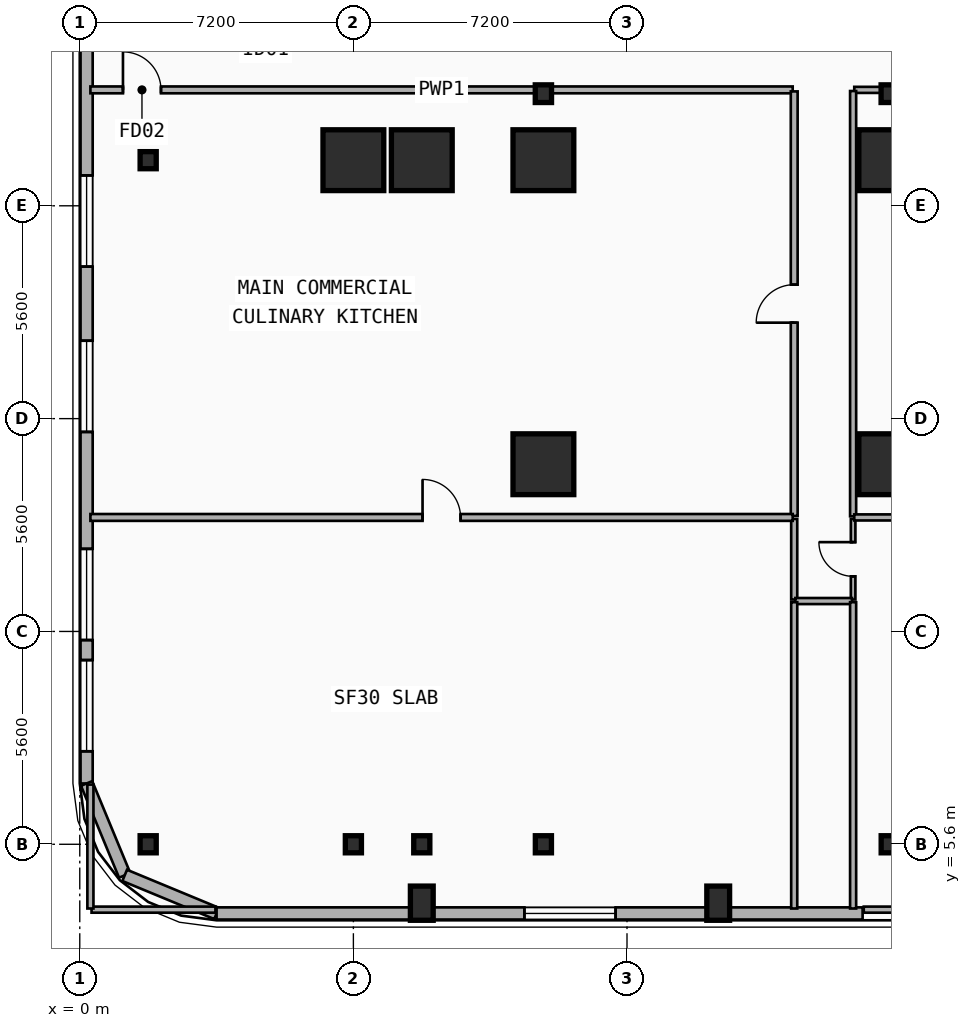
"""IFC4 building model, lengths in metres.
Left out: names, types, materials, properties, quantities, classifications, styles, units other than length and angle.
Written with IfcOpenShell. Run it as: python <this file> out.ifc"""

import sys

from ifc_helpers import new_model, si_unit, direction, frame, frame_2d, origin, origin_2d, place, context, subcontext, project, spatial, rectangle, i_section, extrude, element, fill, save


model = new_model("IFC4")
c1 = context("Model", 3, precision=1e-05, world=origin(), true_north=direction((0.0, 1.0)))
c2 = subcontext(c1, "Body", "Model", "MODEL_VIEW")
j1 = project(units=[si_unit("LENGTHUNIT", "METRE"), si_unit("PLANEANGLEUNIT", "RADIAN")], contexts=[c1])
p1 = place(None, origin())
s1 = spatial("IfcSite", under=j1, at=p1, CompositionType="ELEMENT")
p2 = place(p1, origin())
s2 = spatial("IfcBuilding", under=s1, at=p2, CompositionType="ELEMENT")
p3 = place(p2, frame((0.0, 0.0, 14.9)))
s3 = spatial("IfcBuildingStorey", under=s2, at=p3, CompositionType="ELEMENT", Elevation=14.9)
for number, where, z_axis, x_axis in (
    (1, (12.2, 25.35, 0.0), (0.0, 0.0, 1.0), (1.0, 0.0, 0.0)),
    (2, (21.3, 25.35, 0.0), (0.0, 0.0, 1.0), (1.0, 0.0, 0.0)),
):
    element("IfcColumn", number, at=place(p3, frame(where, z_axis=z_axis, x_axis=x_axis)), inside=s3, PredefinedType="COLUMN", context=c2, shape_type="SweptSolid", body=[
        extrude(i_section(OverallWidth=0.428, OverallDepth=0.465, WebThickness=0.045, FlangeThickness=0.073, FilletRadius=0.015, at=origin_2d()), origin(), (0.0, 0.0, 1.0), 4.5),
    ])
for number, where, z_axis, x_axis in (
    (3, (1.8, 5.6, 0.0), (0.0, 0.0, 1.0), (1.0, 0.0, 0.0)),
    (4, (1.8, 23.6, 0.0), (0.0, 0.0, 1.0), (1.0, 0.0, 0.0)),
    (5, (7.2, 5.6, 0.0), (0.0, 0.0, 1.0), (1.0, 0.0, 0.0)),
):
    element("IfcColumn", number, at=place(p3, frame(where, z_axis=z_axis, x_axis=x_axis)), inside=s3, PredefinedType="COLUMN", context=c2, shape_type="SweptSolid", body=[
        extrude(i_section(OverallWidth=0.424, OverallDepth=0.45, WebThickness=0.041, FlangeThickness=0.065, FilletRadius=0.015, at=origin_2d()), origin(), (0.0, 0.0, 1.0), 4.5),
    ])
p4 = place(p3, frame((7.2, 23.6, 0.0), z_axis=(0.0, 0.0, 1.0), x_axis=(1.0, 0.0, 0.0)))
e6 = element("IfcColumn", 6, at=p4, inside=s3, PredefinedType="COLUMN", context=c2, shape_type="SweptSolid", body=[
    extrude(rectangle(XDim=1.6, YDim=1.6, at=origin_2d()), origin(), (0.0, 0.0, 1.0), 4.5),
])
p5 = place(p3, frame((9.0, 5.6, 0.0), z_axis=(0.0, 0.0, 1.0), x_axis=(1.0, 0.0, 0.0)))
e7 = element("IfcColumn", 7, at=p5, inside=s3, PredefinedType="COLUMN", context=c2, shape_type="SweptSolid", body=[
    extrude(i_section(OverallWidth=0.424, OverallDepth=0.45, WebThickness=0.041, FlangeThickness=0.065, FilletRadius=0.015, at=origin_2d()), origin(), (0.0, 0.0, 1.0), 4.5),
])
p6 = place(p3, frame((9.0, 23.6, 0.0), z_axis=(0.0, 0.0, 1.0), x_axis=(1.0, 0.0, 0.0)))
e8 = element("IfcColumn", 8, at=p6, inside=s3, PredefinedType="COLUMN", context=c2, shape_type="SweptSolid", body=[
    extrude(rectangle(XDim=1.6, YDim=1.6, at=origin_2d()), origin(), (0.0, 0.0, 1.0), 4.5),
])
p7 = place(p3, frame((12.2, 5.6, 0.0), z_axis=(0.0, 0.0, 1.0), x_axis=(1.0, 0.0, 0.0)))
e9 = element("IfcColumn", 9, at=p7, inside=s3, PredefinedType="COLUMN", context=c2, shape_type="SweptSolid", body=[
    extrude(i_section(OverallWidth=0.424, OverallDepth=0.45, WebThickness=0.041, FlangeThickness=0.065, FilletRadius=0.015, at=origin_2d()), origin(), (0.0, 0.0, 1.0), 4.5),
])
for number, where, z_axis, x_axis in (
    (10, (12.2, 15.6, 0.0), (0.0, 0.0, 1.0), (1.0, 0.0, 0.0)),
    (11, (12.2, 23.6, 0.0), (0.0, 0.0, 1.0), (1.0, 0.0, 0.0)),
):
    element("IfcColumn", number, at=place(p3, frame(where, z_axis=z_axis, x_axis=x_axis)), inside=s3, PredefinedType="COLUMN", context=c2, shape_type="SweptSolid", body=[
        extrude(rectangle(XDim=1.6, YDim=1.6, at=origin_2d()), origin(), (0.0, 0.0, 1.0), 4.5),
    ])
p8 = place(p3, frame((21.3, 5.6, 0.0), z_axis=(0.0, 0.0, 1.0), x_axis=(1.0, 0.0, 0.0)))
e12 = element("IfcColumn", 12, at=p8, inside=s3, PredefinedType="COLUMN", context=c2, shape_type="SweptSolid", body=[
    extrude(i_section(OverallWidth=0.424, OverallDepth=0.45, WebThickness=0.041, FlangeThickness=0.065, FilletRadius=0.015, at=origin_2d()), origin(), (0.0, 0.0, 1.0), 4.5),
])
for number, where, z_axis, x_axis in (
    (13, (21.3, 15.6, 0.0), (0.0, 0.0, 1.0), (1.0, 0.0, 0.0)),
    (14, (21.3, 23.6, 0.0), (0.0, 0.0, 1.0), (1.0, 0.0, 0.0)),
):
    element("IfcColumn", number, at=place(p3, frame(where, z_axis=z_axis, x_axis=x_axis)), inside=s3, PredefinedType="COLUMN", context=c2, shape_type="SweptSolid", body=[
        extrude(rectangle(XDim=1.6, YDim=1.6, at=origin_2d()), origin(), (0.0, 0.0, 1.0), 4.5),
    ])
for number, where, z_axis, x_axis in (
    (15, (9.0, 4.05, 0.0), (0.0, 0.0, 1.0), (1.0, 0.0, 0.0)),
    (16, (16.8, 4.05, 0.0), (0.0, 0.0, 1.0), (1.0, 0.0, 0.0)),
):
    element("IfcColumn", number, at=place(p3, frame(where, z_axis=z_axis, x_axis=x_axis)), inside=s3, PredefinedType="PILASTER", context=c2, shape_type="SweptSolid", body=[
        extrude(rectangle(XDim=0.6, YDim=0.9, at=origin_2d()), origin(), (0.0, 0.0, 1.0), 4.5),
    ])
p9 = place(p3, frame((0.18, 7.2, 0.0), z_axis=(0.0, 0.0, 1.0), x_axis=(0.0, 1.0, 0.0)))
e17 = element("IfcWall", 17, at=p9, inside=s3, PredefinedType="SOLIDWALL", context=c2, shape_type="SweptSolid", body=[
    extrude(rectangle(XDim=34.4, YDim=0.32, at=frame_2d((17.2, 0.0))), origin(), (0.0, 0.0, 1.0), 4.2),
])
p10 = place(p9, frame((22.35, 0.0, 0.9)))
e18 = element("IfcOpeningElement", 18, at=p10, cuts=e17, PredefinedType="OPENING", context=c2, shape_type="SweptSolid", body=[
    extrude(rectangle(XDim=2.4, YDim=1.8, at=frame_2d((1.2, 0.9))), frame((0.0, 0.17, 0.0), z_axis=(0.0, -1.0, 0.0), x_axis=(1.0, 0.0, 0.0)), (0.0, 0.0, 1.0), 0.34),
])
p11 = place(p9, frame((26.4, 0.0, 0.9)))
e19 = element("IfcOpeningElement", 19, at=p11, cuts=e17, PredefinedType="OPENING", context=c2, shape_type="SweptSolid", body=[
    extrude(rectangle(XDim=2.4, YDim=1.8, at=frame_2d((1.2, 0.9))), frame((0.0, 0.17, 0.0), z_axis=(0.0, -1.0, 0.0), x_axis=(1.0, 0.0, 0.0)), (0.0, 0.0, 1.0), 0.34),
])
p12 = place(p9, frame((0.847, 0.0, 0.9)))
e20 = element("IfcOpeningElement", 20, at=p12, cuts=e17, PredefinedType="OPENING", context=c2, shape_type="SweptSolid", body=[
    extrude(rectangle(XDim=2.4, YDim=1.8, at=frame_2d((1.2, 0.9))), frame((0.0, 0.17, 0.0), z_axis=(0.0, -1.0, 0.0), x_axis=(1.0, 0.0, 0.0)), (0.0, 0.0, 1.0), 0.34),
])
p13 = place(p9, frame((3.773, 0.0, 0.9)))
e21 = element("IfcOpeningElement", 21, at=p13, cuts=e17, PredefinedType="OPENING", context=c2, shape_type="SweptSolid", body=[
    extrude(rectangle(XDim=2.4, YDim=1.8, at=frame_2d((1.2, 0.9))), frame((0.0, 0.17, 0.0), z_axis=(0.0, -1.0, 0.0), x_axis=(1.0, 0.0, 0.0)), (0.0, 0.0, 1.0), 0.34),
])
p14 = place(p9, frame((9.25, 0.0, 0.9)))
e22 = element("IfcOpeningElement", 22, at=p14, cuts=e17, PredefinedType="OPENING", context=c2, shape_type="SweptSolid", body=[
    extrude(rectangle(XDim=2.4, YDim=1.8, at=frame_2d((1.2, 0.9))), frame((0.0, 0.17, 0.0), z_axis=(0.0, -1.0, 0.0), x_axis=(1.0, 0.0, 0.0)), (0.0, 0.0, 1.0), 0.34),
])
p15 = place(p9, frame((13.6, 0.0, 0.9)))
e23 = element("IfcOpeningElement", 23, at=p15, cuts=e17, PredefinedType="OPENING", context=c2, shape_type="SweptSolid", body=[
    extrude(rectangle(XDim=2.4, YDim=1.8, at=frame_2d((1.2, 0.9))), frame((0.0, 0.17, 0.0), z_axis=(0.0, -1.0, 0.0), x_axis=(1.0, 0.0, 0.0)), (0.0, 0.0, 1.0), 0.34),
])
p16 = place(p3, frame((1.182, 4.782, 0.0), z_axis=(0.0, 0.0, 1.0), x_axis=(-0.382700522567, 0.923872453333, 0.0)))
e24 = element("IfcWall", 24, at=p16, inside=s3, PredefinedType="SOLIDWALL", context=c2, shape_type="SweptSolid", body=[
    extrude(rectangle(XDim=2.617, YDim=0.32, at=frame_2d((1.309, 0.0))), origin(), (0.0, 0.0, 1.0), 4.2),
])
p17 = place(p3, frame((3.6, 3.78, 0.0), z_axis=(0.0, 0.0, 1.0), x_axis=(-0.923886112352, 0.382667546838, 0.0)))
e25 = element("IfcWall", 25, at=p17, inside=s3, PredefinedType="SOLIDWALL", context=c2, shape_type="SweptSolid", body=[
    extrude(rectangle(XDim=2.618, YDim=0.32, at=frame_2d((1.309, 0.0))), origin(), (0.0, 0.0, 1.0), 4.2),
])
p18 = place(p3, frame((20.6, 3.78, 0.0), z_axis=(0.0, 0.0, 1.0), x_axis=(-1.0, 0.0, 0.0)))
e26 = element("IfcWall", 26, at=p18, inside=s3, PredefinedType="SOLIDWALL", context=c2, shape_type="SweptSolid", body=[
    extrude(rectangle(XDim=17.0, YDim=0.32, at=frame_2d((8.5, 0.0))), origin(), (0.0, 0.0, 1.0), 4.2),
])
p19 = place(p18, frame((6.5, 0.0, 0.9)))
e27 = element("IfcOpeningElement", 27, at=p19, cuts=e26, PredefinedType="OPENING", context=c2, shape_type="SweptSolid", body=[
    extrude(rectangle(XDim=2.4, YDim=1.8, at=frame_2d((1.2, 0.9))), frame((0.0, 0.17, 0.0), z_axis=(0.0, -1.0, 0.0), x_axis=(1.0, 0.0, 0.0)), (0.0, 0.0, 1.0), 0.34),
])
p20 = place(p3, frame((0.28, 25.45, 0.0), z_axis=(0.0, 0.0, 1.0), x_axis=(1.0, 0.0, 0.0)))
e28 = element("IfcWall", 28, at=p20, inside=s3, PredefinedType="PLUMBINGWALL", context=c2, shape_type="SweptSolid", body=[
    extrude(rectangle(XDim=18.48, YDim=0.18, at=frame_2d((9.24, 0.0))), origin(), (0.0, 0.0, 1.0), 3.366),
])
p21 = place(p20, frame((0.857, 0.0, 0.0)))
e29 = element("IfcOpeningElement", 29, at=p21, cuts=e28, PredefinedType="OPENING", context=c2, shape_type="SweptSolid", body=[
    extrude(rectangle(XDim=1.0, YDim=2.15, at=frame_2d((0.5, 1.075))), frame((0.0, 0.1, 0.0), z_axis=(0.0, -1.0, 0.0), x_axis=(1.0, 0.0, 0.0)), (0.0, 0.0, 1.0), 0.2),
])
p22 = place(p3, frame((18.8, 12.04, 0.0), z_axis=(0.0, 0.0, 1.0), x_axis=(0.0, 1.0, 0.0)))
e30 = element("IfcWall", 30, at=p22, inside=s3, PredefinedType="PARTITIONING", context=c2, shape_type="SweptSolid", body=[
    extrude(rectangle(XDim=2.12, YDim=0.16, at=frame_2d((1.06, 0.0))), origin(), (0.0, 0.0, 1.0), 3.82),
])
p23 = place(p3, frame((18.8, 14.24, 0.0), z_axis=(0.0, 0.0, 1.0), x_axis=(0.0, 1.0, 0.0)))
e31 = element("IfcWall", 31, at=p23, inside=s3, PredefinedType="PLUMBINGWALL", context=c2, shape_type="SweptSolid", body=[
    extrude(rectangle(XDim=11.17, YDim=0.18, at=frame_2d((5.585, 0.0))), origin(), (0.0, 0.0, 1.0), 3.172),
])
p24 = place(p23, frame((5.085, 0.0, 0.0)))
e32 = element("IfcOpeningElement", 32, at=p24, cuts=e31, PredefinedType="OPENING", context=c2, shape_type="SweptSolid", body=[
    extrude(rectangle(XDim=1.0, YDim=2.15, at=frame_2d((0.5, 1.075))), frame((0.0, 0.1, 0.0), z_axis=(0.0, -1.0, 0.0), x_axis=(1.0, 0.0, 0.0)), (0.0, 0.0, 1.0), 0.2),
])
p25 = place(p3, frame((20.35, 12.04, 0.0), z_axis=(0.0, 0.0, 1.0), x_axis=(0.0, 1.0, 0.0)))
e33 = element("IfcWall", 33, at=p25, inside=s3, PredefinedType="PARTITIONING", context=c2, shape_type="SweptSolid", body=[
    extrude(rectangle(XDim=2.12, YDim=0.12, at=frame_2d((1.06, 0.0))), origin(), (0.0, 0.0, 1.0), 3.82),
])
p26 = place(p25, frame((0.61, 0.0, 0.0)))
e34 = element("IfcOpeningElement", 34, at=p26, cuts=e33, PredefinedType="OPENING", context=c2, shape_type="SweptSolid", body=[
    extrude(rectangle(XDim=0.9, YDim=2.1, at=frame_2d((0.45, 1.05))), frame((0.0, 0.07, 0.0), z_axis=(0.0, -1.0, 0.0), x_axis=(1.0, 0.0, 0.0)), (0.0, 0.0, 1.0), 0.14),
])
p27 = place(p3, frame((0.28, 14.2, 0.0), z_axis=(0.0, 0.0, 1.0), x_axis=(1.0, 0.0, 0.0)))
e35 = element("IfcWall", 35, at=p27, inside=s3, PredefinedType="PLUMBINGWALL", context=c2, shape_type="SweptSolid", body=[
    extrude(rectangle(XDim=18.48, YDim=0.18, at=frame_2d((9.24, 0.0))), origin(), (0.0, 0.0, 1.0), 3.366),
])
p28 = place(p27, frame((8.74, 0.0, 0.0)))
e36 = element("IfcOpeningElement", 36, at=p28, cuts=e35, PredefinedType="OPENING", context=c2, shape_type="SweptSolid", body=[
    extrude(rectangle(XDim=1.0, YDim=2.15, at=frame_2d((0.5, 1.075))), frame((0.0, 0.1, 0.0), z_axis=(0.0, -1.0, 0.0), x_axis=(1.0, 0.0, 0.0)), (0.0, 0.0, 1.0), 0.2),
])
p29 = place(p3, frame((20.38, 25.45, 0.0), z_axis=(0.0, 0.0, 1.0), x_axis=(1.0, 0.0, 0.0)))
e37 = element("IfcWall", 37, at=p29, inside=s3, PredefinedType="PARTITIONING", context=c2, shape_type="SweptSolid", body=[
    extrude(rectangle(XDim=15.94, YDim=0.16, at=frame_2d((7.97, 0.0))), origin(), (0.0, 0.0, 1.0), 3.366),
])
p30 = place(p3, frame((18.83, 12.0, 0.0), z_axis=(0.0, 0.0, 1.0), x_axis=(1.0, 0.0, 0.0)))
e38 = element("IfcWall", 38, at=p30, inside=s3, PredefinedType="PARTITIONING", context=c2, shape_type="SweptSolid", body=[
    extrude(rectangle(XDim=1.49, YDim=0.16, at=frame_2d((0.745, 0.0))), origin(), (0.0, 0.0, 1.0), 3.82),
])
p31 = place(p3, frame((20.35, 14.23, 0.0), z_axis=(0.0, 0.0, 1.0), x_axis=(0.0, 1.0, 0.0)))
e39 = element("IfcWall", 39, at=p31, inside=s3, PredefinedType="PARTITIONING", context=c2, shape_type="SweptSolid", body=[
    extrude(rectangle(XDim=11.19, YDim=0.16, at=frame_2d((5.595, 0.0))), origin(), (0.0, 0.0, 1.0), 3.172),
])
for number, where, z_axis, x_axis in (
    (40, (0.31, 3.88, 0.0), (0.0, 0.0, 1.0), (1.0, 0.0, 0.0)),
    (41, (0.28, 3.91, 0.0), (0.0, 0.0, 1.0), (0.0, 1.0, 0.0)),
):
    element("IfcWall", number, at=place(p3, frame(where, z_axis=z_axis, x_axis=x_axis)), inside=s3, PredefinedType="PARTITIONING", context=c2, shape_type="SweptSolid", body=[
        extrude(rectangle(XDim=3.26, YDim=0.16, at=frame_2d((1.63, 0.0))), origin(), (0.0, 0.0, 1.0), 4.2),
    ])
p32 = place(p3, frame((18.8, 3.91, 0.0), z_axis=(0.0, 0.0, 1.0), x_axis=(0.0, 1.0, 0.0)))
e42 = element("IfcWall", 42, at=p32, inside=s3, PredefinedType="PARTITIONING", context=c2, shape_type="SweptSolid", body=[
    extrude(rectangle(XDim=8.06, YDim=0.16, at=frame_2d((4.03, 0.0))), origin(), (0.0, 0.0, 1.0), 3.53),
])
p33 = place(p3, frame((20.63, 3.88, 0.0), z_axis=(0.0, 0.0, 1.0), x_axis=(1.0, 0.0, 0.0)))
e43 = element("IfcWall", 43, at=p33, inside=s3, PredefinedType="PARTITIONING", context=c2, shape_type="SweptSolid", body=[
    extrude(rectangle(XDim=1.44, YDim=0.16, at=frame_2d((0.72, 0.0))), origin(), (0.0, 0.0, 1.0), 4.2),
])
p34 = place(p3, frame((20.38, 14.2, 0.0), z_axis=(0.0, 0.0, 1.0), x_axis=(1.0, 0.0, 0.0)))
e44 = element("IfcWall", 44, at=p34, inside=s3, PredefinedType="PARTITIONING", context=c2, shape_type="SweptSolid", body=[
    extrude(rectangle(XDim=15.94, YDim=0.16, at=frame_2d((7.97, 0.0))), origin(), (0.0, 0.0, 1.0), 3.366),
])
p35 = place(p3, frame((20.35, 3.91, 0.0), z_axis=(0.0, 0.0, 1.0), x_axis=(0.0, 1.0, 0.0)))
e45 = element("IfcWall", 45, at=p35, inside=s3, PredefinedType="PARTITIONING", context=c2, shape_type="SweptSolid", body=[
    extrude(rectangle(XDim=8.06, YDim=0.16, at=frame_2d((4.03, 0.0))), origin(), (0.0, 0.0, 1.0), 3.53),
])
p36 = place(p12, origin())
e46 = element("IfcWindow", 46, at=p36, inside=s3, PartitioningType="SINGLE_PANEL", PredefinedType="WINDOW", context=c2, shape_type="SweptSolid", body=[
    extrude(rectangle(XDim=2.4, YDim=1.8, at=frame_2d((1.2, 0.9))), frame((0.0, 0.03, 0.0), z_axis=(0.0, -1.0, 0.0), x_axis=(1.0, 0.0, 0.0)), (0.0, 0.0, 1.0), 0.06),
])
fill(e20, e46)
p37 = place(p13, origin())
e47 = element("IfcWindow", 47, at=p37, inside=s3, PartitioningType="SINGLE_PANEL", PredefinedType="WINDOW", context=c2, shape_type="SweptSolid", body=[
    extrude(rectangle(XDim=2.4, YDim=1.8, at=frame_2d((1.2, 0.9))), frame((0.0, 0.03, 0.0), z_axis=(0.0, -1.0, 0.0), x_axis=(1.0, 0.0, 0.0)), (0.0, 0.0, 1.0), 0.06),
])
fill(e21, e47)
p38 = place(p14, origin())
e48 = element("IfcWindow", 48, at=p38, inside=s3, PartitioningType="SINGLE_PANEL", PredefinedType="WINDOW", context=c2, shape_type="SweptSolid", body=[
    extrude(rectangle(XDim=2.4, YDim=1.8, at=frame_2d((1.2, 0.9))), frame((0.0, 0.03, 0.0), z_axis=(0.0, -1.0, 0.0), x_axis=(1.0, 0.0, 0.0)), (0.0, 0.0, 1.0), 0.06),
])
fill(e22, e48)
p39 = place(p15, origin())
e49 = element("IfcWindow", 49, at=p39, inside=s3, PartitioningType="SINGLE_PANEL", PredefinedType="WINDOW", context=c2, shape_type="SweptSolid", body=[
    extrude(rectangle(XDim=2.4, YDim=1.8, at=frame_2d((1.2, 0.9))), frame((0.0, 0.03, 0.0), z_axis=(0.0, -1.0, 0.0), x_axis=(1.0, 0.0, 0.0)), (0.0, 0.0, 1.0), 0.06),
])
fill(e23, e49)
p40 = place(p19, origin())
e50 = element("IfcWindow", 50, at=p40, inside=s3, PartitioningType="SINGLE_PANEL", PredefinedType="WINDOW", context=c2, shape_type="SweptSolid", body=[
    extrude(rectangle(XDim=2.4, YDim=1.8, at=frame_2d((1.2, 0.9))), frame((0.0, 0.03, 0.0), z_axis=(0.0, -1.0, 0.0), x_axis=(1.0, 0.0, 0.0)), (0.0, 0.0, 1.0), 0.06),
])
fill(e27, e50)
p41 = place(p21, origin())
e51 = element("IfcDoor", 51, at=p41, inside=s3, OperationType="SINGLE_SWING_LEFT", PredefinedType="DOOR", context=c2, shape_type="SweptSolid", body=[
    extrude(rectangle(XDim=1.0, YDim=2.15, at=frame_2d((0.5, 1.075))), frame((0.0, 0.025, 0.0), z_axis=(0.0, -1.0, 0.0), x_axis=(1.0, 0.0, 0.0)), (0.0, 0.0, 1.0), 0.05),
])
fill(e29, e51)
p42 = place(p24, origin())
e52 = element("IfcDoor", 52, at=p42, inside=s3, OperationType="SINGLE_SWING_LEFT", PredefinedType="DOOR", context=c2, shape_type="SweptSolid", body=[
    extrude(rectangle(XDim=1.0, YDim=2.15, at=frame_2d((0.5, 1.075))), frame((0.0, 0.025, 0.0), z_axis=(0.0, -1.0, 0.0), x_axis=(1.0, 0.0, 0.0)), (0.0, 0.0, 1.0), 0.05),
])
fill(e32, e52)
p43 = place(p26, origin())
e53 = element("IfcDoor", 53, at=p43, inside=s3, OperationType="SINGLE_SWING_RIGHT", PredefinedType="DOOR", context=c2, shape_type="SweptSolid", body=[
    extrude(rectangle(XDim=0.9, YDim=2.1, at=frame_2d((0.45, 1.05))), frame((0.0, 0.025, 0.0), z_axis=(0.0, -1.0, 0.0), x_axis=(1.0, 0.0, 0.0)), (0.0, 0.0, 1.0), 0.05),
])
fill(e34, e53)
p44 = place(p28, origin())
e54 = element("IfcDoor", 54, at=p44, inside=s3, OperationType="SINGLE_SWING_LEFT", PredefinedType="DOOR", context=c2, shape_type="SweptSolid", body=[
    extrude(rectangle(XDim=1.0, YDim=2.15, at=frame_2d((0.5, 1.075))), frame((0.0, 0.025, 0.0), z_axis=(0.0, -1.0, 0.0), x_axis=(1.0, 0.0, 0.0)), (0.0, 0.0, 1.0), 0.05),
])
fill(e36, e54)
save(model, sys.argv[1])
